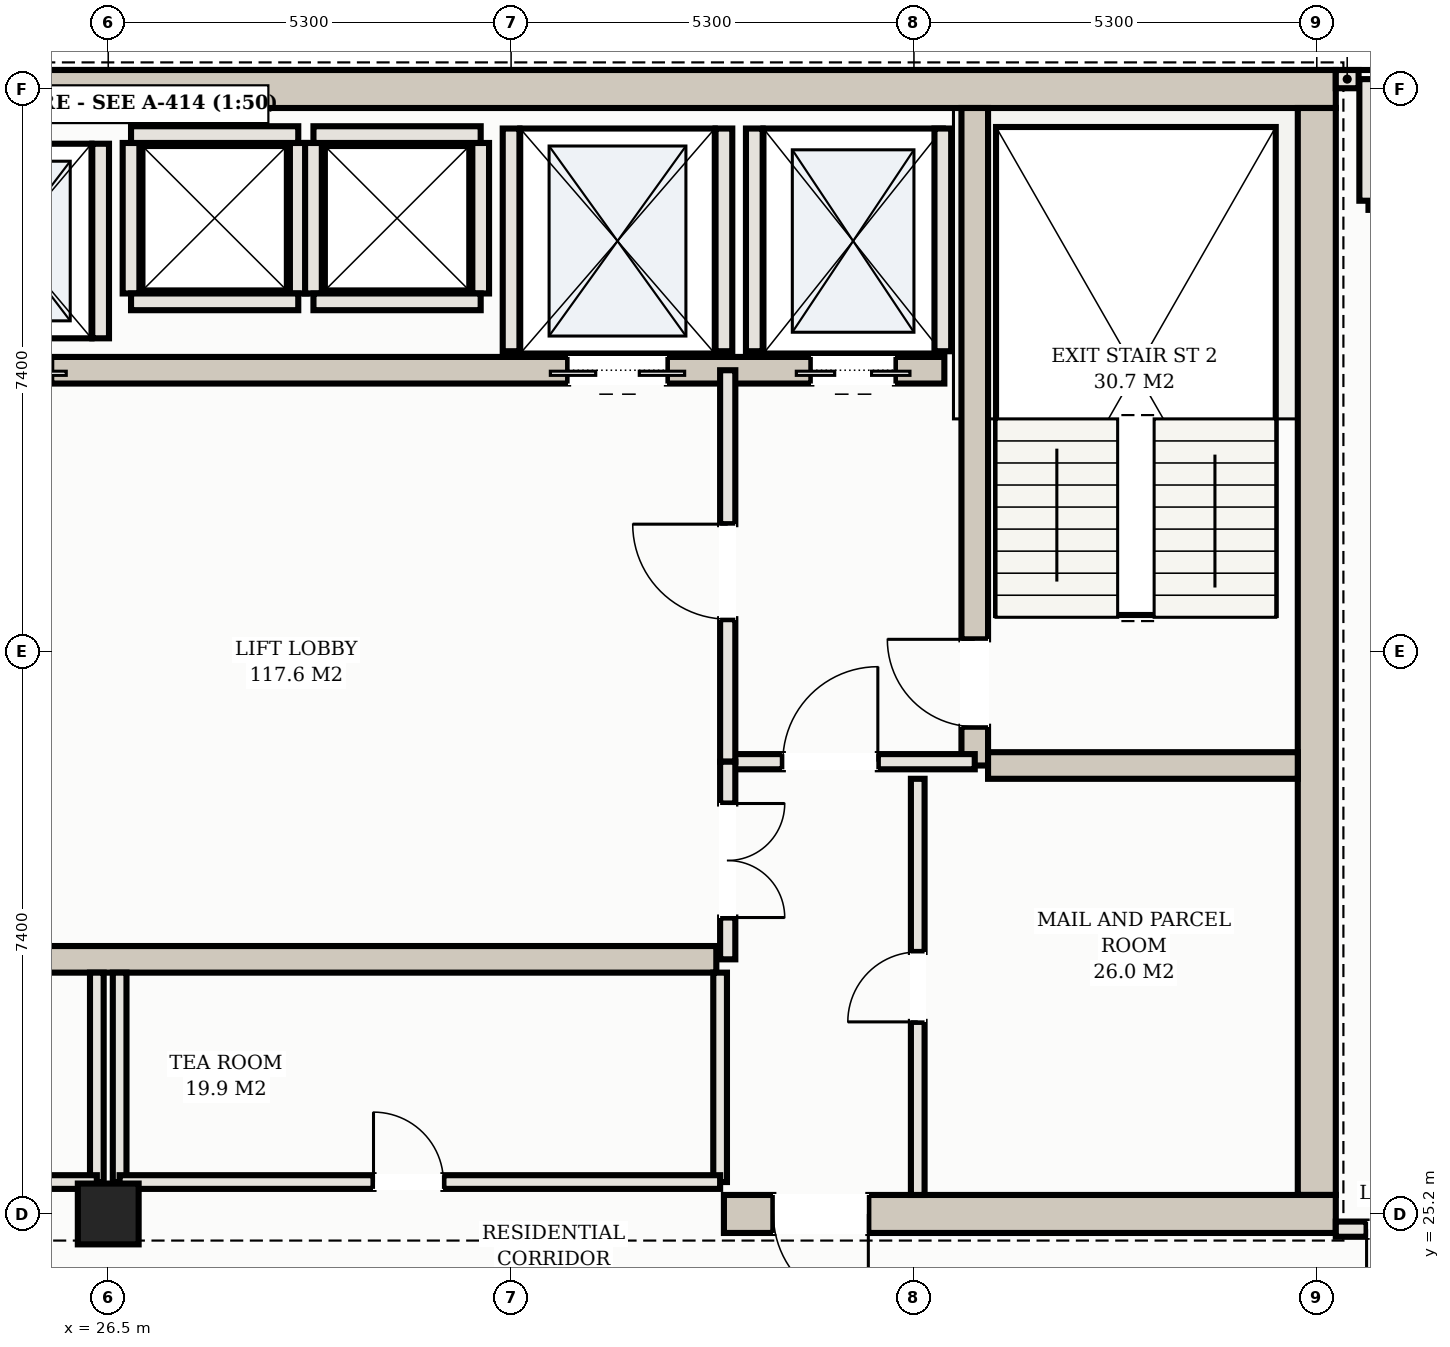
"""IFC4 building model, lengths in metres.
Left out: names, types, materials, properties, quantities, classifications, styles, units other than length and angle.
Written with IfcOpenShell. Run it as: python <this file> out.ifc"""

import sys

from ifc_helpers import new_model, si_unit, direction, frame, frame_2d, origin, origin_2d, place, context, subcontext, project, spatial, rectangle, hollow_rectangle, extrude, element, fill, save


model = new_model("IFC4")
c1 = context("Model", 3, precision=1e-05, world=origin(), true_north=direction((0.0, 1.0)))
c2 = subcontext(c1, "Body", "Model", "MODEL_VIEW")
j1 = project(units=[si_unit("LENGTHUNIT", "METRE"), si_unit("PLANEANGLEUNIT", "RADIAN")], contexts=[c1])
p1 = place(None, origin())
s1 = spatial("IfcSite", under=j1, at=p1, CompositionType="ELEMENT")
p2 = place(p1, origin())
s2 = spatial("IfcBuilding", under=s1, at=p2, CompositionType="ELEMENT")
p3 = place(p2, frame((0.0, 0.0, 209.9)))
s3 = spatial("IfcBuildingStorey", under=s2, at=p3, CompositionType="ELEMENT", Elevation=209.9)
p4 = place(p3, frame((10.35, 40.0, 0.0), z_axis=(0.0, 0.0, 1.0), x_axis=(1.0, 0.0, 0.0)))
e1 = element("IfcWall", 1, at=p4, inside=s3, PredefinedType="SHEAR", context=c2, shape_type="SweptSolid", body=[
    extrude(rectangle(XDim=32.3, YDim=0.5, at=frame_2d((16.15, 0.0))), origin(), (0.0, 0.0, 1.0), 3.11),
])
p5 = place(p3, frame((42.4, 25.45, 0.0), z_axis=(0.0, 0.0, 1.0), x_axis=(0.0, 1.0, 0.0)))
e2 = element("IfcWall", 2, at=p5, inside=s3, PredefinedType="SHEAR", context=c2, shape_type="SweptSolid", body=[
    extrude(rectangle(XDim=14.3, YDim=0.5, at=frame_2d((7.15, 0.0))), origin(), (0.0, 0.0, 1.0), 3.11),
])
p6 = place(p3, frame((34.6, 25.2, 0.0), z_axis=(0.0, 0.0, 1.0), x_axis=(1.0, 0.0, 0.0)))
e3 = element("IfcWall", 3, at=p6, inside=s3, PredefinedType="SHEAR", context=c2, shape_type="SweptSolid", body=[
    extrude(rectangle(XDim=8.05, YDim=0.5, at=frame_2d((4.025, 0.0))), origin(), (0.0, 0.0, 1.0), 3.11),
])
p7 = place(p6, frame((0.65, 0.0, 0.0)))
e4 = element("IfcOpeningElement", 4, at=p7, cuts=e3, PredefinedType="OPENING", context=c2, shape_type="SweptSolid", body=[
    extrude(rectangle(XDim=1.25, YDim=2.2, at=frame_2d((0.625, 1.1))), frame((0.0, 0.26, 0.0), z_axis=(0.0, -1.0, 0.0), x_axis=(1.0, 0.0, 0.0)), (0.0, 0.0, 1.0), 0.52),
])
p8 = place(p3, frame((37.9, 31.1, 0.0), z_axis=(0.0, 0.0, 1.0), x_axis=(0.0, 1.0, 0.0)))
e5 = element("IfcWall", 5, at=p8, inside=s3, PredefinedType="SHEAR", context=c2, shape_type="SweptSolid", body=[
    extrude(rectangle(XDim=8.65, YDim=0.35, at=frame_2d((4.325, 0.0))), origin(), (0.0, 0.0, 1.0), 3.11),
])
p9 = place(p8, frame((0.51, 0.0, 0.0)))
e6 = element("IfcOpeningElement", 6, at=p9, cuts=e5, PredefinedType="OPENING", context=c2, shape_type="SweptSolid", body=[
    extrude(rectangle(XDim=1.15, YDim=2.2, at=frame_2d((0.575, 1.1))), frame((0.0, 0.185, 0.0), z_axis=(0.0, -1.0, 0.0), x_axis=(1.0, 0.0, 0.0)), (0.0, 0.0, 1.0), 0.37),
])
p10 = place(p3, frame((38.075, 31.1, 0.0), z_axis=(0.0, 0.0, 1.0), x_axis=(1.0, 0.0, 0.0)))
e7 = element("IfcWall", 7, at=p10, inside=s3, PredefinedType="SHEAR", context=c2, shape_type="SweptSolid", body=[
    extrude(rectangle(XDim=4.075, YDim=0.35, at=frame_2d((2.038, 0.0))), origin(), (0.0, 0.0, 1.0), 3.11),
])
p11 = place(p3, frame((15.5, 36.3, 0.0), z_axis=(0.0, 0.0, 1.0), x_axis=(1.0, 0.0, 0.0)))
e8 = element("IfcWall", 8, at=p11, inside=s3, PredefinedType="SHEAR", context=c2, shape_type="SweptSolid", body=[
    extrude(rectangle(XDim=22.0, YDim=0.35, at=frame_2d((11.0, 0.0))), origin(), (0.0, 0.0, 1.0), 3.11),
])
p12 = place(p11, frame((0.65, 0.0, 0.0)))
e9 = element("IfcOpeningElement", 9, at=p12, cuts=e8, PredefinedType="OPENING", context=c2, shape_type="SweptSolid", body=[
    extrude(rectangle(XDim=1.1, YDim=2.15, at=frame_2d((0.55, 1.075))), frame((0.0, 0.185, 0.0), z_axis=(0.0, -1.0, 0.0), x_axis=(1.0, 0.0, 0.0)), (0.0, 0.0, 1.0), 0.37),
])
p13 = place(p11, frame((20.25, 0.0, 0.0)))
e10 = element("IfcOpeningElement", 10, at=p13, cuts=e8, PredefinedType="OPENING", context=c2, shape_type="SweptSolid", body=[
    extrude(rectangle(XDim=1.1, YDim=2.15, at=frame_2d((0.55, 1.075))), frame((0.0, 0.185, 0.0), z_axis=(0.0, -1.0, 0.0), x_axis=(1.0, 0.0, 0.0)), (0.0, 0.0, 1.0), 0.37),
])
p14 = place(p11, frame((17.05, 0.0, 0.0)))
e11 = element("IfcOpeningElement", 11, at=p14, cuts=e8, PredefinedType="OPENING", context=c2, shape_type="SweptSolid", body=[
    extrude(rectangle(XDim=1.3, YDim=2.2, at=frame_2d((0.65, 1.1))), frame((0.0, 0.185, 0.0), z_axis=(0.0, -1.0, 0.0), x_axis=(1.0, 0.0, 0.0)), (0.0, 0.0, 1.0), 0.37),
])
p15 = place(p11, frame((3.95, 0.0, 0.0)))
e12 = element("IfcOpeningElement", 12, at=p15, cuts=e8, PredefinedType="OPENING", context=c2, shape_type="SweptSolid", body=[
    extrude(rectangle(XDim=1.1, YDim=2.15, at=frame_2d((0.55, 1.075))), frame((0.0, 0.185, 0.0), z_axis=(0.0, -1.0, 0.0), x_axis=(1.0, 0.0, 0.0)), (0.0, 0.0, 1.0), 0.37),
])
p16 = place(p11, frame((6.55, 0.0, 0.0)))
e13 = element("IfcOpeningElement", 13, at=p16, cuts=e8, PredefinedType="OPENING", context=c2, shape_type="SweptSolid", body=[
    extrude(rectangle(XDim=1.1, YDim=2.15, at=frame_2d((0.55, 1.075))), frame((0.0, 0.185, 0.0), z_axis=(0.0, -1.0, 0.0), x_axis=(1.0, 0.0, 0.0)), (0.0, 0.0, 1.0), 0.37),
])
p17 = place(p11, frame((9.15, 0.0, 0.0)))
e14 = element("IfcOpeningElement", 14, at=p17, cuts=e8, PredefinedType="OPENING", context=c2, shape_type="SweptSolid", body=[
    extrude(rectangle(XDim=1.1, YDim=2.15, at=frame_2d((0.55, 1.075))), frame((0.0, 0.185, 0.0), z_axis=(0.0, -1.0, 0.0), x_axis=(1.0, 0.0, 0.0)), (0.0, 0.0, 1.0), 0.37),
])
p18 = place(p3, frame((18.5, 28.55, 0.0), z_axis=(0.0, 0.0, 1.0), x_axis=(1.0, 0.0, 0.0)))
e15 = element("IfcWall", 15, at=p18, inside=s3, PredefinedType="SHEAR", context=c2, shape_type="SweptSolid", body=[
    extrude(rectangle(XDim=16.0, YDim=0.35, at=frame_2d((8.0, 0.0))), origin(), (0.0, 0.0, 1.0), 3.11),
])
p19 = place(p3, frame((26.5, 25.2, 0.0), z_axis=(0.0, 0.0, 1.0), x_axis=(1.0, 0.0, 0.0)))
e16 = element("IfcColumn", 16, at=p19, inside=s3, PredefinedType="COLUMN", context=c2, shape_type="SweptSolid", body=[
    extrude(hollow_rectangle(XDim=0.8, YDim=0.8, WallThickness=0.028, at=origin_2d()), origin(), (0.0, 0.0, 1.0), 3.3),
])
for number, where, z_axis, x_axis in (
    (17, (35.0, 36.55, 0.0), (0.0, 0.0, 1.0), (0.0, 1.0, 0.0)),
    (18, (37.48, 36.55, 0.0), (0.0, 0.0, 1.0), (0.0, 1.0, 0.0)),
    (19, (31.8, 36.55, 0.0), (0.0, 0.0, 1.0), (0.0, 1.0, 0.0)),
    (20, (34.6, 36.55, 0.0), (0.0, 0.0, 1.0), (0.0, 1.0, 0.0)),
):
    element("IfcWall", number, at=place(p3, frame(where, z_axis=z_axis, x_axis=x_axis)), inside=s3, PredefinedType="SOLIDWALL", context=c2, shape_type="SweptSolid", body=[
        extrude(rectangle(XDim=2.93, YDim=0.22, at=frame_2d((1.465, 0.0))), origin(), (0.0, 0.0, 1.0), 3.11),
    ])
p20 = place(p3, frame((26.4, 36.72, 0.0), z_axis=(0.0, 0.0, 1.0), x_axis=(0.0, 1.0, 0.0)))
e21 = element("IfcWall", 21, at=p20, inside=s3, PredefinedType="SOLIDWALL", context=c2, shape_type="SweptSolid", body=[
    extrude(rectangle(XDim=2.56, YDim=0.22, at=frame_2d((1.28, 0.0))), origin(), (0.0, 0.0, 1.0), 3.11),
])
for number, where, z_axis, x_axis in (
    (22, (26.8, 37.31, 0.0), (0.0, 0.0, 1.0), (0.0, 1.0, 0.0)),
    (23, (29.0, 37.31, 0.0), (0.0, 0.0, 1.0), (0.0, 1.0, 0.0)),
):
    element("IfcWall", number, at=place(p3, frame(where, z_axis=z_axis, x_axis=x_axis)), inside=s3, PredefinedType="SOLIDWALL", context=c2, shape_type="SweptSolid", body=[
        extrude(rectangle(XDim=1.98, YDim=0.22, at=frame_2d((0.99, 0.0))), origin(), (0.0, 0.0, 1.0), 3.11),
    ])
for number, where, z_axis, x_axis in (
    (24, (26.8, 39.4, 0.0), (0.0, 0.0, 1.0), (1.0, 0.0, 0.0)),
    (25, (26.8, 37.2, 0.0), (0.0, 0.0, 1.0), (1.0, 0.0, 0.0)),
):
    element("IfcWall", number, at=place(p3, frame(where, z_axis=z_axis, x_axis=x_axis)), inside=s3, PredefinedType="SOLIDWALL", context=c2, shape_type="SweptSolid", body=[
        extrude(rectangle(XDim=2.2, YDim=0.22, at=frame_2d((1.1, 0.0))), origin(), (0.0, 0.0, 1.0), 3.11),
    ])
for number, where, z_axis, x_axis in (
    (26, (29.2, 37.31, 0.0), (0.0, 0.0, 1.0), (0.0, 1.0, 0.0)),
    (27, (31.4, 37.31, 0.0), (0.0, 0.0, 1.0), (0.0, 1.0, 0.0)),
):
    element("IfcWall", number, at=place(p3, frame(where, z_axis=z_axis, x_axis=x_axis)), inside=s3, PredefinedType="SOLIDWALL", context=c2, shape_type="SweptSolid", body=[
        extrude(rectangle(XDim=1.98, YDim=0.22, at=frame_2d((0.99, 0.0))), origin(), (0.0, 0.0, 1.0), 3.11),
    ])
for number, where, z_axis, x_axis in (
    (28, (29.2, 39.4, 0.0), (0.0, 0.0, 1.0), (1.0, 0.0, 0.0)),
    (29, (29.2, 37.2, 0.0), (0.0, 0.0, 1.0), (1.0, 0.0, 0.0)),
):
    element("IfcWall", number, at=place(p3, frame(where, z_axis=z_axis, x_axis=x_axis)), inside=s3, PredefinedType="SOLIDWALL", context=c2, shape_type="SweptSolid", body=[
        extrude(rectangle(XDim=2.2, YDim=0.22, at=frame_2d((1.1, 0.0))), origin(), (0.0, 0.0, 1.0), 3.11),
    ])
for number, where, z_axis, x_axis in (
    (30, (44.68, 38.53, 0.0), (0.0, 0.0, 1.0), (-1.0, 0.0, 0.0)),
    (31, (43.08, 38.53, 0.0), (0.0, 0.0, 1.0), (0.0, 1.0, 0.0)),
):
    element("IfcWall", number, at=place(p3, frame(where, z_axis=z_axis, x_axis=x_axis)), inside=s3, PredefinedType="SOLIDWALL", context=c2, shape_type="SweptSolid", body=[
        extrude(rectangle(XDim=1.6, YDim=0.24, at=frame_2d((0.8, 0.0))), origin(), (0.0, 0.0, 1.0), 3.11),
    ])
p21 = place(p3, frame((42.95, 40.13, 0.0), z_axis=(0.0, 0.0, 1.0), x_axis=(-1.0, 0.0, 0.0)))
e32 = element("IfcWall", 32, at=p21, inside=s3, PredefinedType="SOLIDWALL", context=c2, shape_type="SweptSolid", body=[
    extrude(rectangle(XDim=0.3, YDim=0.24, at=frame_2d((0.15, 0.0))), origin(), (0.0, 0.0, 1.0), 3.11),
])
p22 = place(p3, frame((34.65, 31.15, 0.0), z_axis=(0.0, 0.0, 1.0), x_axis=(1.0, 0.0, 0.0)))
e33 = element("IfcWall", 33, at=p22, inside=s3, PredefinedType="PARTITIONING", context=c2, shape_type="SweptSolid", body=[
    extrude(rectangle(XDim=3.25, YDim=0.2, at=frame_2d((1.625, 0.0))), origin(), (0.0, 0.0, 1.0), 2.43),
])
p23 = place(p22, frame((0.725, 0.0, 0.0)))
e34 = element("IfcOpeningElement", 34, at=p23, cuts=e33, PredefinedType="OPENING", context=c2, shape_type="SweptSolid", body=[
    extrude(rectangle(XDim=1.25, YDim=2.2, at=frame_2d((0.625, 1.1))), frame((0.0, 0.11, 0.0), z_axis=(0.0, -1.0, 0.0), x_axis=(1.0, 0.0, 0.0)), (0.0, 0.0, 1.0), 0.22),
])
p24 = place(p3, frame((34.65, 31.15, 0.0), z_axis=(0.0, 0.0, 1.0), x_axis=(0.0, 1.0, 0.0)))
e35 = element("IfcWall", 35, at=p24, inside=s3, PredefinedType="PARTITIONING", context=c2, shape_type="SweptSolid", body=[
    extrude(rectangle(XDim=5.15, YDim=0.2, at=frame_2d((2.575, 0.0))), origin(), (0.0, 0.0, 1.0), 2.43),
])
p25 = place(p24, frame((1.875, 0.0, 0.0)))
e36 = element("IfcOpeningElement", 36, at=p25, cuts=e35, PredefinedType="OPENING", context=c2, shape_type="SweptSolid", body=[
    extrude(rectangle(XDim=1.25, YDim=2.2, at=frame_2d((0.625, 1.1))), frame((0.0, 0.11, 0.0), z_axis=(0.0, -1.0, 0.0), x_axis=(1.0, 0.0, 0.0)), (0.0, 0.0, 1.0), 0.22),
])
p26 = place(p3, frame((37.15, 25.45, 0.0), z_axis=(0.0, 0.0, 1.0), x_axis=(0.0, 1.0, 0.0)))
e37 = element("IfcWall", 37, at=p26, inside=s3, PredefinedType="PARTITIONING", context=c2, shape_type="SweptSolid", body=[
    extrude(rectangle(XDim=5.475, YDim=0.18, at=frame_2d((2.738, 0.0))), origin(), (0.0, 0.0, 1.0), 2.43),
])
p27 = place(p26, frame((2.277, 0.0, 0.0)))
e38 = element("IfcOpeningElement", 38, at=p27, cuts=e37, PredefinedType="OPENING", context=c2, shape_type="SweptSolid", body=[
    extrude(rectangle(XDim=0.92, YDim=2.15, at=frame_2d((0.46, 1.075))), frame((0.0, 0.1, 0.0), z_axis=(0.0, -1.0, 0.0), x_axis=(1.0, 0.0, 0.0)), (0.0, 0.0, 1.0), 0.2),
])
p28 = place(p3, frame((34.65, 28.55, 0.0), z_axis=(0.0, 0.0, 1.0), x_axis=(0.0, 1.0, 0.0)))
e39 = element("IfcWall", 39, at=p28, inside=s3, PredefinedType="PARTITIONING", context=c2, shape_type="SweptSolid", body=[
    extrude(rectangle(XDim=2.6, YDim=0.2, at=frame_2d((1.3, 0.0))), origin(), (0.0, 0.0, 1.0), 2.43),
])
p29 = place(p28, frame((0.55, 0.0, 0.0)))
e40 = element("IfcOpeningElement", 40, at=p29, cuts=e39, PredefinedType="OPENING", context=c2, shape_type="SweptSolid", body=[
    extrude(rectangle(XDim=1.5, YDim=2.25, at=frame_2d((0.75, 1.125))), frame((0.0, 0.11, 0.0), z_axis=(0.0, -1.0, 0.0), x_axis=(1.0, 0.0, 0.0)), (0.0, 0.0, 1.0), 0.22),
])
p30 = place(p3, frame((26.35, 25.62, 0.0), z_axis=(0.0, 0.0, 1.0), x_axis=(0.0, 1.0, 0.0)))
e41 = element("IfcWall", 41, at=p30, inside=s3, PredefinedType="PARTITIONING", context=c2, shape_type="SweptSolid", body=[
    extrude(rectangle(XDim=2.755, YDim=0.18, at=frame_2d((1.377, 0.0))), origin(), (0.0, 0.0, 1.0), 2.43),
])
p31 = place(p3, frame((18.45, 25.62, 0.0), z_axis=(0.0, 0.0, 1.0), x_axis=(1.0, 0.0, 0.0)))
e42 = element("IfcWall", 42, at=p31, inside=s3, PredefinedType="PARTITIONING", context=c2, shape_type="SweptSolid", body=[
    extrude(rectangle(XDim=7.9, YDim=0.18, at=frame_2d((3.95, 0.0))), origin(), (0.0, 0.0, 1.0), 2.43),
])
p32 = place(p31, frame((3.34, 0.0, 0.0)))
e43 = element("IfcOpeningElement", 43, at=p32, cuts=e42, PredefinedType="OPENING", context=c2, shape_type="SweptSolid", body=[
    extrude(rectangle(XDim=0.92, YDim=2.15, at=frame_2d((0.46, 1.075))), frame((0.0, 0.1, 0.0), z_axis=(0.0, -1.0, 0.0), x_axis=(1.0, 0.0, 0.0)), (0.0, 0.0, 1.0), 0.2),
])
for number, where, z_axis, x_axis in (
    (44, (26.65, 25.62, 0.0), (0.0, 0.0, 1.0), (0.0, 1.0, 0.0)),
    (45, (34.55, 25.62, 0.0), (0.0, 0.0, 1.0), (0.0, 1.0, 0.0)),
):
    element("IfcWall", number, at=place(p3, frame(where, z_axis=z_axis, x_axis=x_axis)), inside=s3, PredefinedType="PARTITIONING", context=c2, shape_type="SweptSolid", body=[
        extrude(rectangle(XDim=2.755, YDim=0.18, at=frame_2d((1.377, 0.0))), origin(), (0.0, 0.0, 1.0), 2.43),
    ])
p33 = place(p3, frame((26.65, 25.62, 0.0), z_axis=(0.0, 0.0, 1.0), x_axis=(1.0, 0.0, 0.0)))
e46 = element("IfcWall", 46, at=p33, inside=s3, PredefinedType="PARTITIONING", context=c2, shape_type="SweptSolid", body=[
    extrude(rectangle(XDim=7.9, YDim=0.18, at=frame_2d((3.95, 0.0))), origin(), (0.0, 0.0, 1.0), 2.43),
])
p34 = place(p33, frame((3.34, 0.0, 0.0)))
e47 = element("IfcOpeningElement", 47, at=p34, cuts=e46, PredefinedType="OPENING", context=c2, shape_type="SweptSolid", body=[
    extrude(rectangle(XDim=0.92, YDim=2.15, at=frame_2d((0.46, 1.075))), frame((0.0, 0.1, 0.0), z_axis=(0.0, -1.0, 0.0), x_axis=(1.0, 0.0, 0.0)), (0.0, 0.0, 1.0), 0.2),
])
p35 = place(p3, frame((42.65, 25.0, 0.0), z_axis=(0.0, 0.0, 1.0), x_axis=(1.0, 0.0, 0.0)))
e48 = element("IfcWall", 48, at=p35, inside=s3, PredefinedType="PARTITIONING", context=c2, shape_type="SweptSolid", body=[
    extrude(rectangle(XDim=3.63, YDim=0.2, at=frame_2d((1.815, 0.0))), origin(), (0.0, 0.0, 1.0), 2.43),
])
p36 = place(p35, frame((0.405, 0.0, 0.0)))
e49 = element("IfcOpeningElement", 49, at=p36, cuts=e48, PredefinedType="OPENING", context=c2, shape_type="SweptSolid", body=[
    extrude(rectangle(XDim=0.92, YDim=2.15, at=frame_2d((0.46, 1.075))), frame((0.0, 0.11, 0.0), z_axis=(0.0, -1.0, 0.0), x_axis=(1.0, 0.0, 0.0)), (0.0, 0.0, 1.0), 0.22),
])
p37 = place(p13, frame((1.1, 0.0, 0.0), z_axis=(0.0, 0.0, 1.0), x_axis=(-1.0, 0.0, 0.0)))
e50 = element("IfcDoor", 50, at=p37, inside=s3, OperationType="DOUBLE_DOOR_SLIDING", PredefinedType="DOOR", context=c2, shape_type="SweptSolid", body=[
    extrude(rectangle(XDim=1.1, YDim=2.15, at=frame_2d((0.55, 1.075))), frame((0.0, 0.025, 0.0), z_axis=(0.0, -1.0, 0.0), x_axis=(1.0, 0.0, 0.0)), (0.0, 0.0, 1.0), 0.05),
])
fill(e10, e50)
p38 = place(p14, frame((1.3, 0.0, 0.0), z_axis=(0.0, 0.0, 1.0), x_axis=(-1.0, 0.0, 0.0)))
e51 = element("IfcDoor", 51, at=p38, inside=s3, OperationType="DOUBLE_DOOR_SLIDING", PredefinedType="DOOR", context=c2, shape_type="SweptSolid", body=[
    extrude(rectangle(XDim=1.3, YDim=2.2, at=frame_2d((0.65, 1.1))), frame((0.0, 0.025, 0.0), z_axis=(0.0, -1.0, 0.0), x_axis=(1.0, 0.0, 0.0)), (0.0, 0.0, 1.0), 0.05),
])
fill(e11, e51)
p39 = place(p7, frame((1.25, 0.0, 0.0), z_axis=(0.0, 0.0, 1.0), x_axis=(-1.0, 0.0, 0.0)))
e52 = element("IfcDoor", 52, at=p39, inside=s3, OperationType="SINGLE_SWING_LEFT", PredefinedType="DOOR", context=c2, shape_type="SweptSolid", body=[
    extrude(rectangle(XDim=1.25, YDim=2.2, at=frame_2d((0.625, 1.1))), frame((0.0, 0.025, 0.0), z_axis=(0.0, -1.0, 0.0), x_axis=(1.0, 0.0, 0.0)), (0.0, 0.0, 1.0), 0.05),
])
fill(e4, e52)
p40 = place(p23, origin())
e53 = element("IfcDoor", 53, at=p40, inside=s3, OperationType="SINGLE_SWING_RIGHT", PredefinedType="DOOR", context=c2, shape_type="SweptSolid", body=[
    extrude(rectangle(XDim=1.25, YDim=2.2, at=frame_2d((0.625, 1.1))), frame((0.0, 0.025, 0.0), z_axis=(0.0, -1.0, 0.0), x_axis=(1.0, 0.0, 0.0)), (0.0, 0.0, 1.0), 0.05),
])
fill(e34, e53)
p41 = place(p25, origin())
e54 = element("IfcDoor", 54, at=p41, inside=s3, OperationType="SINGLE_SWING_RIGHT", PredefinedType="DOOR", context=c2, shape_type="SweptSolid", body=[
    extrude(rectangle(XDim=1.25, YDim=2.2, at=frame_2d((0.625, 1.1))), frame((0.0, 0.025, 0.0), z_axis=(0.0, -1.0, 0.0), x_axis=(1.0, 0.0, 0.0)), (0.0, 0.0, 1.0), 0.05),
])
fill(e36, e54)
p42 = place(p9, origin())
e55 = element("IfcDoor", 55, at=p42, inside=s3, OperationType="SINGLE_SWING_RIGHT", PredefinedType="DOOR", context=c2, shape_type="SweptSolid", body=[
    extrude(rectangle(XDim=1.15, YDim=2.2, at=frame_2d((0.575, 1.1))), frame((0.0, 0.025, 0.0), z_axis=(0.0, -1.0, 0.0), x_axis=(1.0, 0.0, 0.0)), (0.0, 0.0, 1.0), 0.05),
])
fill(e6, e55)
p43 = place(p27, origin())
e56 = element("IfcDoor", 56, at=p43, inside=s3, OperationType="SINGLE_SWING_LEFT", PredefinedType="DOOR", context=c2, shape_type="SweptSolid", body=[
    extrude(rectangle(XDim=0.92, YDim=2.15, at=frame_2d((0.46, 1.075))), frame((0.0, 0.025, 0.0), z_axis=(0.0, -1.0, 0.0), x_axis=(1.0, 0.0, 0.0)), (0.0, 0.0, 1.0), 0.05),
])
fill(e38, e56)
p44 = place(p29, frame((1.5, 0.0, 0.0), z_axis=(0.0, 0.0, 1.0), x_axis=(-1.0, 0.0, 0.0)))
e57 = element("IfcDoor", 57, at=p44, inside=s3, OperationType="DOUBLE_DOOR_SINGLE_SWING", PredefinedType="DOOR", context=c2, shape_type="SweptSolid", body=[
    extrude(rectangle(XDim=1.5, YDim=2.25, at=frame_2d((0.75, 1.125))), frame((0.0, 0.025, 0.0), z_axis=(0.0, -1.0, 0.0), x_axis=(1.0, 0.0, 0.0)), (0.0, 0.0, 1.0), 0.05),
])
fill(e40, e57)
p45 = place(p34, origin())
e58 = element("IfcDoor", 58, at=p45, inside=s3, OperationType="SINGLE_SWING_LEFT", PredefinedType="DOOR", context=c2, shape_type="SweptSolid", body=[
    extrude(rectangle(XDim=0.92, YDim=2.15, at=frame_2d((0.46, 1.075))), frame((0.0, 0.025, 0.0), z_axis=(0.0, -1.0, 0.0), x_axis=(1.0, 0.0, 0.0)), (0.0, 0.0, 1.0), 0.05),
])
fill(e47, e58)
p46 = place(p36, frame((0.92, 0.0, 0.0), z_axis=(0.0, 0.0, 1.0), x_axis=(-1.0, 0.0, 0.0)))
e59 = element("IfcDoor", 59, at=p46, inside=s3, OperationType="SINGLE_SWING_RIGHT", PredefinedType="DOOR", context=c2, shape_type="SweptSolid", body=[
    extrude(rectangle(XDim=0.92, YDim=2.15, at=frame_2d((0.46, 1.075))), frame((0.0, 0.025, 0.0), z_axis=(0.0, -1.0, 0.0), x_axis=(1.0, 0.0, 0.0)), (0.0, 0.0, 1.0), 0.05),
])
fill(e49, e59)
save(model, sys.argv[1])
